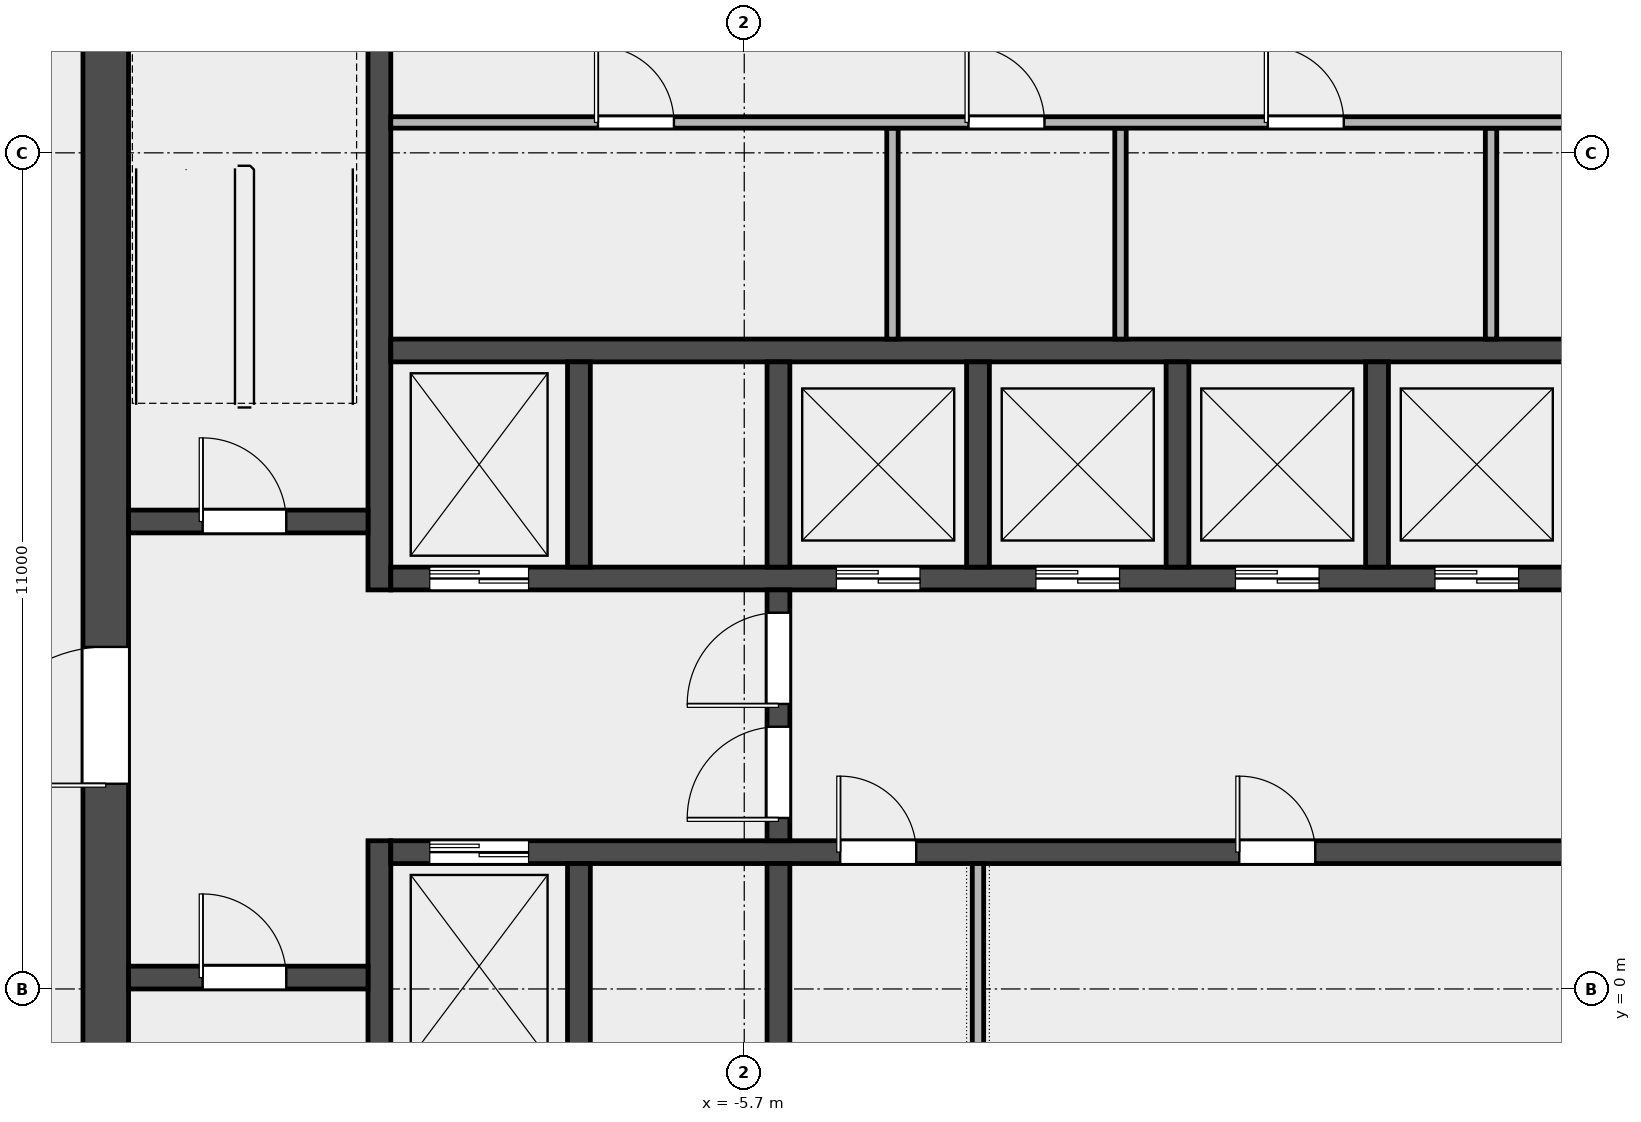
"""IFC4 building model, lengths in metres.
Left out: names, types, materials, properties, quantities, classifications, styles, units other than length and angle.
Written with IfcOpenShell. Run it as: python <this file> out.ifc"""

import sys

from ifc_helpers import new_model, si_unit, direction, frame, frame_2d, origin, place, context, subcontext, project, spatial, rectangle, extrude, element, fill, save


model = new_model("IFC4")
c1 = context("Model", 3, precision=1e-05, world=origin(), true_north=direction((0.0, 1.0)))
c2 = subcontext(c1, "Body", "Model", "MODEL_VIEW")
j1 = project(units=[si_unit("LENGTHUNIT", "METRE"), si_unit("PLANEANGLEUNIT", "RADIAN")], contexts=[c1])
p1 = place(None, origin())
s1 = spatial("IfcSite", under=j1, at=p1, CompositionType="ELEMENT")
p2 = place(p1, origin())
s2 = spatial("IfcBuilding", under=s1, at=p2, CompositionType="ELEMENT")
p3 = place(p2, frame((0.0, 0.0, 287.4)))
s3 = spatial("IfcBuildingStorey", under=s2, at=p3, CompositionType="ELEMENT", Elevation=287.4)
p4 = place(p3, frame((-14.1, -6.6, 0.0), z_axis=(0.0, 0.0, 1.0), x_axis=(0.0, 1.0, 0.0)))
e1 = element("IfcWall", 1, at=p4, inside=s3, PredefinedType="SHEAR", context=c2, shape_type="SweptSolid", body=[
    extrude(rectangle(XDim=19.5, YDim=0.6, at=frame_2d((9.75, 0.0))), origin(), (0.0, 0.0, 1.0), 3.7),
])
p5 = place(p4, frame((9.3, 0.0, 0.0)))
e2 = element("IfcOpeningElement", 2, at=p5, cuts=e1, PredefinedType="OPENING", context=c2, shape_type="SweptSolid", body=[
    extrude(rectangle(XDim=1.8, YDim=2.1, at=frame_2d((0.9, 1.05))), frame((0.0, 0.312, 0.0), z_axis=(0.0, -1.0, 0.0), x_axis=(1.0, 0.0, 0.0)), (0.0, 0.0, 1.0), 0.624),
])
p6 = place(p3, frame((-10.5, -6.6, 0.0), z_axis=(0.0, 0.0, 1.0), x_axis=(0.0, 1.0, 0.0)))
e3 = element("IfcWall", 3, at=p6, inside=s3, PredefinedType="SHEAR", context=c2, shape_type="SweptSolid", body=[
    extrude(rectangle(XDim=8.55, YDim=0.3, at=frame_2d((4.275, 0.0))), origin(), (0.0, 0.0, 1.0), 3.7),
])
p7 = place(p3, frame((-10.5, 5.25, 0.0), z_axis=(0.0, 0.0, 1.0), x_axis=(0.0, 1.0, 0.0)))
e4 = element("IfcWall", 4, at=p7, inside=s3, PredefinedType="SHEAR", context=c2, shape_type="SweptSolid", body=[
    extrude(rectangle(XDim=7.65, YDim=0.3, at=frame_2d((3.825, 0.0))), origin(), (0.0, 0.0, 1.0), 3.7),
])
p8 = place(p3, frame((-13.8, 0.15, 0.0), z_axis=(0.0, 0.0, 1.0), x_axis=(1.0, 0.0, 0.0)))
e5 = element("IfcWall", 5, at=p8, inside=s3, PredefinedType="SOLIDWALL", context=c2, shape_type="SweptSolid", body=[
    extrude(rectangle(XDim=3.15, YDim=0.3, at=frame_2d((1.575, 0.0))), origin(), (0.0, 0.0, 1.0), 3.7),
])
p9 = place(p8, frame((0.975, 0.0, 0.0)))
e6 = element("IfcOpeningElement", 6, at=p9, cuts=e5, PredefinedType="OPENING", context=c2, shape_type="SweptSolid", body=[
    extrude(rectangle(XDim=1.1, YDim=2.1, at=frame_2d((0.55, 1.05))), frame((0.0, 0.162, 0.0), z_axis=(0.0, -1.0, 0.0), x_axis=(1.0, 0.0, 0.0)), (0.0, 0.0, 1.0), 0.324),
])
p10 = place(p3, frame((-13.8, 6.15, 0.0), z_axis=(0.0, 0.0, 1.0), x_axis=(1.0, 0.0, 0.0)))
e7 = element("IfcWall", 7, at=p10, inside=s3, PredefinedType="SOLIDWALL", context=c2, shape_type="SweptSolid", body=[
    extrude(rectangle(XDim=3.15, YDim=0.3, at=frame_2d((1.575, 0.0))), origin(), (0.0, 0.0, 1.0), 3.7),
])
p11 = place(p10, frame((0.975, 0.0, 0.0)))
e8 = element("IfcOpeningElement", 8, at=p11, cuts=e7, PredefinedType="OPENING", context=c2, shape_type="SweptSolid", body=[
    extrude(rectangle(XDim=1.1, YDim=2.1, at=frame_2d((0.55, 1.05))), frame((0.0, 0.162, 0.0), z_axis=(0.0, -1.0, 0.0), x_axis=(1.0, 0.0, 0.0)), (0.0, 0.0, 1.0), 0.324),
])
p12 = place(p3, frame((-10.35, 1.8, 0.0), z_axis=(0.0, 0.0, 1.0), x_axis=(1.0, 0.0, 0.0)))
e9 = element("IfcWall", 9, at=p12, inside=s3, PredefinedType="SOLIDWALL", context=c2, shape_type="SweptSolid", body=[
    extrude(rectangle(XDim=20.7, YDim=0.3, at=frame_2d((10.35, 0.0))), origin(), (0.0, 0.0, 1.0), 3.7),
])
p13 = place(p12, frame((0.512, 0.0, 0.0)))
e10 = element("IfcOpeningElement", 10, at=p13, cuts=e9, PredefinedType="OPENING", context=c2, shape_type="SweptSolid", body=[
    extrude(rectangle(XDim=1.3, YDim=2.1, at=frame_2d((0.65, 1.05))), frame((0.0, 0.162, 0.0), z_axis=(0.0, -1.0, 0.0), x_axis=(1.0, 0.0, 0.0)), (0.0, 0.0, 1.0), 0.324),
])
p14 = place(p12, frame((5.913, 0.0, 0.0)))
e11 = element("IfcOpeningElement", 11, at=p14, cuts=e9, PredefinedType="OPENING", context=c2, shape_type="SweptSolid", body=[
    extrude(rectangle(XDim=1.0, YDim=2.1, at=frame_2d((0.5, 1.05))), frame((0.0, 0.162, 0.0), z_axis=(0.0, -1.0, 0.0), x_axis=(1.0, 0.0, 0.0)), (0.0, 0.0, 1.0), 0.324),
])
p15 = place(p12, frame((11.163, 0.0, 0.0)))
e12 = element("IfcOpeningElement", 12, at=p15, cuts=e9, PredefinedType="OPENING", context=c2, shape_type="SweptSolid", body=[
    extrude(rectangle(XDim=1.0, YDim=2.1, at=frame_2d((0.5, 1.05))), frame((0.0, 0.162, 0.0), z_axis=(0.0, -1.0, 0.0), x_axis=(1.0, 0.0, 0.0)), (0.0, 0.0, 1.0), 0.324),
])
p16 = place(p12, frame((17.725, 0.0, 0.0)))
e13 = element("IfcOpeningElement", 13, at=p16, cuts=e9, PredefinedType="OPENING", context=c2, shape_type="SweptSolid", body=[
    extrude(rectangle(XDim=1.0, YDim=2.1, at=frame_2d((0.5, 1.05))), frame((0.0, 0.162, 0.0), z_axis=(0.0, -1.0, 0.0), x_axis=(1.0, 0.0, 0.0)), (0.0, 0.0, 1.0), 0.324),
])
p17 = place(p3, frame((-10.35, 5.4, 0.0), z_axis=(0.0, 0.0, 1.0), x_axis=(1.0, 0.0, 0.0)))
e14 = element("IfcWall", 14, at=p17, inside=s3, PredefinedType="SOLIDWALL", context=c2, shape_type="SweptSolid", body=[
    extrude(rectangle(XDim=20.7, YDim=0.3, at=frame_2d((10.35, 0.0))), origin(), (0.0, 0.0, 1.0), 3.7),
])
p18 = place(p17, frame((0.512, 0.0, 0.0)))
e15 = element("IfcOpeningElement", 15, at=p18, cuts=e14, PredefinedType="OPENING", context=c2, shape_type="SweptSolid", body=[
    extrude(rectangle(XDim=1.3, YDim=2.1, at=frame_2d((0.65, 1.05))), frame((0.0, 0.162, 0.0), z_axis=(0.0, -1.0, 0.0), x_axis=(1.0, 0.0, 0.0)), (0.0, 0.0, 1.0), 0.324),
])
p19 = place(p17, frame((5.863, 0.0, 0.0)))
e16 = element("IfcOpeningElement", 16, at=p19, cuts=e14, PredefinedType="OPENING", context=c2, shape_type="SweptSolid", body=[
    extrude(rectangle(XDim=1.1, YDim=2.1, at=frame_2d((0.55, 1.05))), frame((0.0, 0.162, 0.0), z_axis=(0.0, -1.0, 0.0), x_axis=(1.0, 0.0, 0.0)), (0.0, 0.0, 1.0), 0.324),
])
p20 = place(p17, frame((8.488, 0.0, 0.0)))
e17 = element("IfcOpeningElement", 17, at=p20, cuts=e14, PredefinedType="OPENING", context=c2, shape_type="SweptSolid", body=[
    extrude(rectangle(XDim=1.1, YDim=2.1, at=frame_2d((0.55, 1.05))), frame((0.0, 0.162, 0.0), z_axis=(0.0, -1.0, 0.0), x_axis=(1.0, 0.0, 0.0)), (0.0, 0.0, 1.0), 0.324),
])
p21 = place(p17, frame((11.113, 0.0, 0.0)))
e18 = element("IfcOpeningElement", 18, at=p21, cuts=e14, PredefinedType="OPENING", context=c2, shape_type="SweptSolid", body=[
    extrude(rectangle(XDim=1.1, YDim=2.1, at=frame_2d((0.55, 1.05))), frame((0.0, 0.162, 0.0), z_axis=(0.0, -1.0, 0.0), x_axis=(1.0, 0.0, 0.0)), (0.0, 0.0, 1.0), 0.324),
])
p22 = place(p17, frame((13.738, 0.0, 0.0)))
e19 = element("IfcOpeningElement", 19, at=p22, cuts=e14, PredefinedType="OPENING", context=c2, shape_type="SweptSolid", body=[
    extrude(rectangle(XDim=1.1, YDim=2.1, at=frame_2d((0.55, 1.05))), frame((0.0, 0.162, 0.0), z_axis=(0.0, -1.0, 0.0), x_axis=(1.0, 0.0, 0.0)), (0.0, 0.0, 1.0), 0.324),
])
p23 = place(p17, frame((16.363, 0.0, 0.0)))
e20 = element("IfcOpeningElement", 20, at=p23, cuts=e14, PredefinedType="OPENING", context=c2, shape_type="SweptSolid", body=[
    extrude(rectangle(XDim=1.1, YDim=2.1, at=frame_2d((0.55, 1.05))), frame((0.0, 0.162, 0.0), z_axis=(0.0, -1.0, 0.0), x_axis=(1.0, 0.0, 0.0)), (0.0, 0.0, 1.0), 0.324),
])
p24 = place(p17, frame((18.988, 0.0, 0.0)))
e21 = element("IfcOpeningElement", 21, at=p24, cuts=e14, PredefinedType="OPENING", context=c2, shape_type="SweptSolid", body=[
    extrude(rectangle(XDim=1.1, YDim=2.1, at=frame_2d((0.55, 1.05))), frame((0.0, 0.162, 0.0), z_axis=(0.0, -1.0, 0.0), x_axis=(1.0, 0.0, 0.0)), (0.0, 0.0, 1.0), 0.324),
])
p25 = place(p3, frame((-10.35, 8.4, 0.0), z_axis=(0.0, 0.0, 1.0), x_axis=(1.0, 0.0, 0.0)))
e22 = element("IfcWall", 22, at=p25, inside=s3, PredefinedType="SOLIDWALL", context=c2, shape_type="SweptSolid", body=[
    extrude(rectangle(XDim=20.7, YDim=0.3, at=frame_2d((10.35, 0.0))), origin(), (0.0, 0.0, 1.0), 3.7),
])
for number, where, z_axis, x_axis in (
    (23, (-7.875, -1.05, 0.0), (0.0, 0.0, 1.0), (0.0, 1.0, 0.0)),
    (24, (-5.25, -1.05, 0.0), (0.0, 0.0, 1.0), (0.0, 1.0, 0.0)),
    (25, (-7.875, 5.55, 0.0), (0.0, 0.0, 1.0), (0.0, 1.0, 0.0)),
    (26, (-5.25, 5.55, 0.0), (0.0, 0.0, 1.0), (0.0, 1.0, 0.0)),
    (27, (-2.625, 5.55, 0.0), (0.0, 0.0, 1.0), (0.0, 1.0, 0.0)),
    (28, (0.0, 5.55, 0.0), (0.0, 0.0, 1.0), (0.0, 1.0, 0.0)),
    (29, (2.625, 5.55, 0.0), (0.0, 0.0, 1.0), (0.0, 1.0, 0.0)),
):
    element("IfcWall", number, at=place(p3, frame(where, z_axis=z_axis, x_axis=x_axis)), inside=s3, PredefinedType="SOLIDWALL", context=c2, shape_type="SweptSolid", body=[
        extrude(rectangle(XDim=2.7, YDim=0.3, at=frame_2d((1.35, 0.0))), origin(), (0.0, 0.0, 1.0), 3.7),
    ])
p26 = place(p3, frame((-5.25, 1.95, 0.0), z_axis=(0.0, 0.0, 1.0), x_axis=(0.0, 1.0, 0.0)))
e30 = element("IfcWall", 30, at=p26, inside=s3, PredefinedType="SOLIDWALL", context=c2, shape_type="SweptSolid", body=[
    extrude(rectangle(XDim=3.3, YDim=0.3, at=frame_2d((1.65, 0.0))), origin(), (0.0, 0.0, 1.0), 3.7),
])
p27 = place(p26, frame((0.3, 0.0, 0.0)))
e31 = element("IfcOpeningElement", 31, at=p27, cuts=e30, PredefinedType="OPENING", context=c2, shape_type="SweptSolid", body=[
    extrude(rectangle(XDim=1.2, YDim=2.1, at=frame_2d((0.6, 1.05))), frame((0.0, 0.162, 0.0), z_axis=(0.0, -1.0, 0.0), x_axis=(1.0, 0.0, 0.0)), (0.0, 0.0, 1.0), 0.324),
])
p28 = place(p26, frame((1.8, 0.0, 0.0)))
e32 = element("IfcOpeningElement", 32, at=p28, cuts=e30, PredefinedType="OPENING", context=c2, shape_type="SweptSolid", body=[
    extrude(rectangle(XDim=1.2, YDim=2.1, at=frame_2d((0.6, 1.05))), frame((0.0, 0.162, 0.0), z_axis=(0.0, -1.0, 0.0), x_axis=(1.0, 0.0, 0.0)), (0.0, 0.0, 1.0), 0.324),
])
for number, where, z_axis, x_axis in (
    (33, (-3.75, 8.55, 0.0), (0.0, 0.0, 1.0), (0.0, 1.0, 0.0)),
    (34, (-0.75, 8.55, 0.0), (0.0, 0.0, 1.0), (0.0, 1.0, 0.0)),
    (35, (4.125, 8.55, 0.0), (0.0, 0.0, 1.0), (0.0, 1.0, 0.0)),
):
    element("IfcWall", number, at=place(p3, frame(where, z_axis=z_axis, x_axis=x_axis)), inside=s3, PredefinedType="PARTITIONING", context=c2, shape_type="SweptSolid", body=[
        extrude(rectangle(XDim=2.775, YDim=0.15, at=frame_2d((1.387, 0.0))), origin(), (0.0, 0.0, 1.0), 3.7),
    ])
p29 = place(p3, frame((-10.35, 11.4, 0.0), z_axis=(0.0, 0.0, 1.0), x_axis=(1.0, 0.0, 0.0)))
e36 = element("IfcWall", 36, at=p29, inside=s3, PredefinedType="PARTITIONING", context=c2, shape_type="SweptSolid", body=[
    extrude(rectangle(XDim=20.7, YDim=0.15, at=frame_2d((10.35, 0.0))), origin(), (0.0, 0.0, 1.0), 3.7),
])
p30 = place(p29, frame((2.725, 0.0, 0.0)))
e37 = element("IfcOpeningElement", 37, at=p30, cuts=e36, PredefinedType="OPENING", context=c2, shape_type="SweptSolid", body=[
    extrude(rectangle(XDim=1.0, YDim=2.1, at=frame_2d((0.5, 1.05))), frame((0.0, 0.087, 0.0), z_axis=(0.0, -1.0, 0.0), x_axis=(1.0, 0.0, 0.0)), (0.0, 0.0, 1.0), 0.174),
])
p31 = place(p29, frame((7.6, 0.0, 0.0)))
e38 = element("IfcOpeningElement", 38, at=p31, cuts=e36, PredefinedType="OPENING", context=c2, shape_type="SweptSolid", body=[
    extrude(rectangle(XDim=1.0, YDim=2.1, at=frame_2d((0.5, 1.05))), frame((0.0, 0.087, 0.0), z_axis=(0.0, -1.0, 0.0), x_axis=(1.0, 0.0, 0.0)), (0.0, 0.0, 1.0), 0.174),
])
p32 = place(p29, frame((11.538, 0.0, 0.0)))
e39 = element("IfcOpeningElement", 39, at=p32, cuts=e36, PredefinedType="OPENING", context=c2, shape_type="SweptSolid", body=[
    extrude(rectangle(XDim=1.0, YDim=2.1, at=frame_2d((0.5, 1.05))), frame((0.0, 0.087, 0.0), z_axis=(0.0, -1.0, 0.0), x_axis=(1.0, 0.0, 0.0)), (0.0, 0.0, 1.0), 0.174),
])
p33 = place(p29, frame((17.163, 0.0, 0.0)))
e40 = element("IfcOpeningElement", 40, at=p33, cuts=e36, PredefinedType="OPENING", context=c2, shape_type="SweptSolid", body=[
    extrude(rectangle(XDim=1.0, YDim=2.1, at=frame_2d((0.5, 1.05))), frame((0.0, 0.087, 0.0), z_axis=(0.0, -1.0, 0.0), x_axis=(1.0, 0.0, 0.0)), (0.0, 0.0, 1.0), 0.174),
])
p34 = place(p3, frame((-2.625, -1.05, 0.0), z_axis=(0.0, 0.0, 1.0), x_axis=(0.0, 1.0, 0.0)))
e41 = element("IfcWall", 41, at=p34, inside=s3, PredefinedType="PARTITIONING", context=c2, shape_type="SweptSolid", body=[
    extrude(rectangle(XDim=2.7, YDim=0.15, at=frame_2d((1.35, 0.0))), origin(), (0.0, 0.0, 1.0), 3.7),
])
p35 = place(p9, origin())
e42 = element("IfcDoor", 42, at=p35, inside=s3, OperationType="SINGLE_SWING_LEFT", PredefinedType="DOOR", context=c2, shape_type="SweptSolid", body=[
    extrude(rectangle(XDim=1.1, YDim=2.1, at=frame_2d((0.55, 1.05))), frame((0.0, 0.025, 0.0), z_axis=(0.0, -1.0, 0.0), x_axis=(1.0, 0.0, 0.0)), (0.0, 0.0, 1.0), 0.05),
])
fill(e6, e42)
p36 = place(p11, origin())
e43 = element("IfcDoor", 43, at=p36, inside=s3, OperationType="SINGLE_SWING_LEFT", PredefinedType="DOOR", context=c2, shape_type="SweptSolid", body=[
    extrude(rectangle(XDim=1.1, YDim=2.1, at=frame_2d((0.55, 1.05))), frame((0.0, 0.025, 0.0), z_axis=(0.0, -1.0, 0.0), x_axis=(1.0, 0.0, 0.0)), (0.0, 0.0, 1.0), 0.05),
])
fill(e8, e43)
p37 = place(p5, origin())
e44 = element("IfcDoor", 44, at=p37, inside=s3, OperationType="DOUBLE_DOOR_SINGLE_SWING", PredefinedType="DOOR", context=c2, shape_type="SweptSolid", body=[
    extrude(rectangle(XDim=1.8, YDim=2.1, at=frame_2d((0.9, 1.05))), frame((0.0, 0.025, 0.0), z_axis=(0.0, -1.0, 0.0), x_axis=(1.0, 0.0, 0.0)), (0.0, 0.0, 1.0), 0.05),
])
fill(e2, e44)
p38 = place(p27, origin())
e45 = element("IfcDoor", 45, at=p38, inside=s3, OperationType="SINGLE_SWING_LEFT", PredefinedType="DOOR", context=c2, shape_type="SweptSolid", body=[
    extrude(rectangle(XDim=1.2, YDim=2.1, at=frame_2d((0.6, 1.05))), frame((0.0, 0.025, 0.0), z_axis=(0.0, -1.0, 0.0), x_axis=(1.0, 0.0, 0.0)), (0.0, 0.0, 1.0), 0.05),
])
fill(e31, e45)
p39 = place(p28, origin())
e46 = element("IfcDoor", 46, at=p39, inside=s3, OperationType="SINGLE_SWING_RIGHT", PredefinedType="DOOR", context=c2, shape_type="SweptSolid", body=[
    extrude(rectangle(XDim=1.2, YDim=2.1, at=frame_2d((0.6, 1.05))), frame((0.0, 0.025, 0.0), z_axis=(0.0, -1.0, 0.0), x_axis=(1.0, 0.0, 0.0)), (0.0, 0.0, 1.0), 0.05),
])
fill(e32, e46)
p40 = place(p13, origin())
e47 = element("IfcDoor", 47, at=p40, inside=s3, OperationType="DOUBLE_DOOR_SLIDING", PredefinedType="DOOR", context=c2, shape_type="SweptSolid", body=[
    extrude(rectangle(XDim=1.3, YDim=2.1, at=frame_2d((0.65, 1.05))), frame((0.0, 0.025, 0.0), z_axis=(0.0, -1.0, 0.0), x_axis=(1.0, 0.0, 0.0)), (0.0, 0.0, 1.0), 0.05),
])
fill(e10, e47)
p41 = place(p18, origin())
e48 = element("IfcDoor", 48, at=p41, inside=s3, OperationType="DOUBLE_DOOR_SLIDING", PredefinedType="DOOR", context=c2, shape_type="SweptSolid", body=[
    extrude(rectangle(XDim=1.3, YDim=2.1, at=frame_2d((0.65, 1.05))), frame((0.0, 0.025, 0.0), z_axis=(0.0, -1.0, 0.0), x_axis=(1.0, 0.0, 0.0)), (0.0, 0.0, 1.0), 0.05),
])
fill(e15, e48)
p42 = place(p19, origin())
e49 = element("IfcDoor", 49, at=p42, inside=s3, OperationType="DOUBLE_DOOR_SLIDING", PredefinedType="DOOR", context=c2, shape_type="SweptSolid", body=[
    extrude(rectangle(XDim=1.1, YDim=2.1, at=frame_2d((0.55, 1.05))), frame((0.0, 0.025, 0.0), z_axis=(0.0, -1.0, 0.0), x_axis=(1.0, 0.0, 0.0)), (0.0, 0.0, 1.0), 0.05),
])
fill(e16, e49)
p43 = place(p20, origin())
e50 = element("IfcDoor", 50, at=p43, inside=s3, OperationType="DOUBLE_DOOR_SLIDING", PredefinedType="DOOR", context=c2, shape_type="SweptSolid", body=[
    extrude(rectangle(XDim=1.1, YDim=2.1, at=frame_2d((0.55, 1.05))), frame((0.0, 0.025, 0.0), z_axis=(0.0, -1.0, 0.0), x_axis=(1.0, 0.0, 0.0)), (0.0, 0.0, 1.0), 0.05),
])
fill(e17, e50)
p44 = place(p21, origin())
e51 = element("IfcDoor", 51, at=p44, inside=s3, OperationType="DOUBLE_DOOR_SLIDING", PredefinedType="DOOR", context=c2, shape_type="SweptSolid", body=[
    extrude(rectangle(XDim=1.1, YDim=2.1, at=frame_2d((0.55, 1.05))), frame((0.0, 0.025, 0.0), z_axis=(0.0, -1.0, 0.0), x_axis=(1.0, 0.0, 0.0)), (0.0, 0.0, 1.0), 0.05),
])
fill(e18, e51)
p45 = place(p22, origin())
e52 = element("IfcDoor", 52, at=p45, inside=s3, OperationType="DOUBLE_DOOR_SLIDING", PredefinedType="DOOR", context=c2, shape_type="SweptSolid", body=[
    extrude(rectangle(XDim=1.1, YDim=2.1, at=frame_2d((0.55, 1.05))), frame((0.0, 0.025, 0.0), z_axis=(0.0, -1.0, 0.0), x_axis=(1.0, 0.0, 0.0)), (0.0, 0.0, 1.0), 0.05),
])
fill(e19, e52)
p46 = place(p30, origin())
e53 = element("IfcDoor", 53, at=p46, inside=s3, OperationType="SINGLE_SWING_LEFT", PredefinedType="DOOR", context=c2, shape_type="SweptSolid", body=[
    extrude(rectangle(XDim=1.0, YDim=2.1, at=frame_2d((0.5, 1.05))), frame((0.0, 0.025, 0.0), z_axis=(0.0, -1.0, 0.0), x_axis=(1.0, 0.0, 0.0)), (0.0, 0.0, 1.0), 0.05),
])
fill(e37, e53)
p47 = place(p31, origin())
e54 = element("IfcDoor", 54, at=p47, inside=s3, OperationType="SINGLE_SWING_LEFT", PredefinedType="DOOR", context=c2, shape_type="SweptSolid", body=[
    extrude(rectangle(XDim=1.0, YDim=2.1, at=frame_2d((0.5, 1.05))), frame((0.0, 0.025, 0.0), z_axis=(0.0, -1.0, 0.0), x_axis=(1.0, 0.0, 0.0)), (0.0, 0.0, 1.0), 0.05),
])
fill(e38, e54)
p48 = place(p32, origin())
e55 = element("IfcDoor", 55, at=p48, inside=s3, OperationType="SINGLE_SWING_LEFT", PredefinedType="DOOR", context=c2, shape_type="SweptSolid", body=[
    extrude(rectangle(XDim=1.0, YDim=2.1, at=frame_2d((0.5, 1.05))), frame((0.0, 0.025, 0.0), z_axis=(0.0, -1.0, 0.0), x_axis=(1.0, 0.0, 0.0)), (0.0, 0.0, 1.0), 0.05),
])
fill(e39, e55)
p49 = place(p14, origin())
e56 = element("IfcDoor", 56, at=p49, inside=s3, OperationType="SINGLE_SWING_LEFT", PredefinedType="DOOR", context=c2, shape_type="SweptSolid", body=[
    extrude(rectangle(XDim=1.0, YDim=2.1, at=frame_2d((0.5, 1.05))), frame((0.0, 0.025, 0.0), z_axis=(0.0, -1.0, 0.0), x_axis=(1.0, 0.0, 0.0)), (0.0, 0.0, 1.0), 0.05),
])
fill(e11, e56)
p50 = place(p15, origin())
e57 = element("IfcDoor", 57, at=p50, inside=s3, OperationType="SINGLE_SWING_LEFT", PredefinedType="DOOR", context=c2, shape_type="SweptSolid", body=[
    extrude(rectangle(XDim=1.0, YDim=2.1, at=frame_2d((0.5, 1.05))), frame((0.0, 0.025, 0.0), z_axis=(0.0, -1.0, 0.0), x_axis=(1.0, 0.0, 0.0)), (0.0, 0.0, 1.0), 0.05),
])
fill(e12, e57)
save(model, sys.argv[1])
